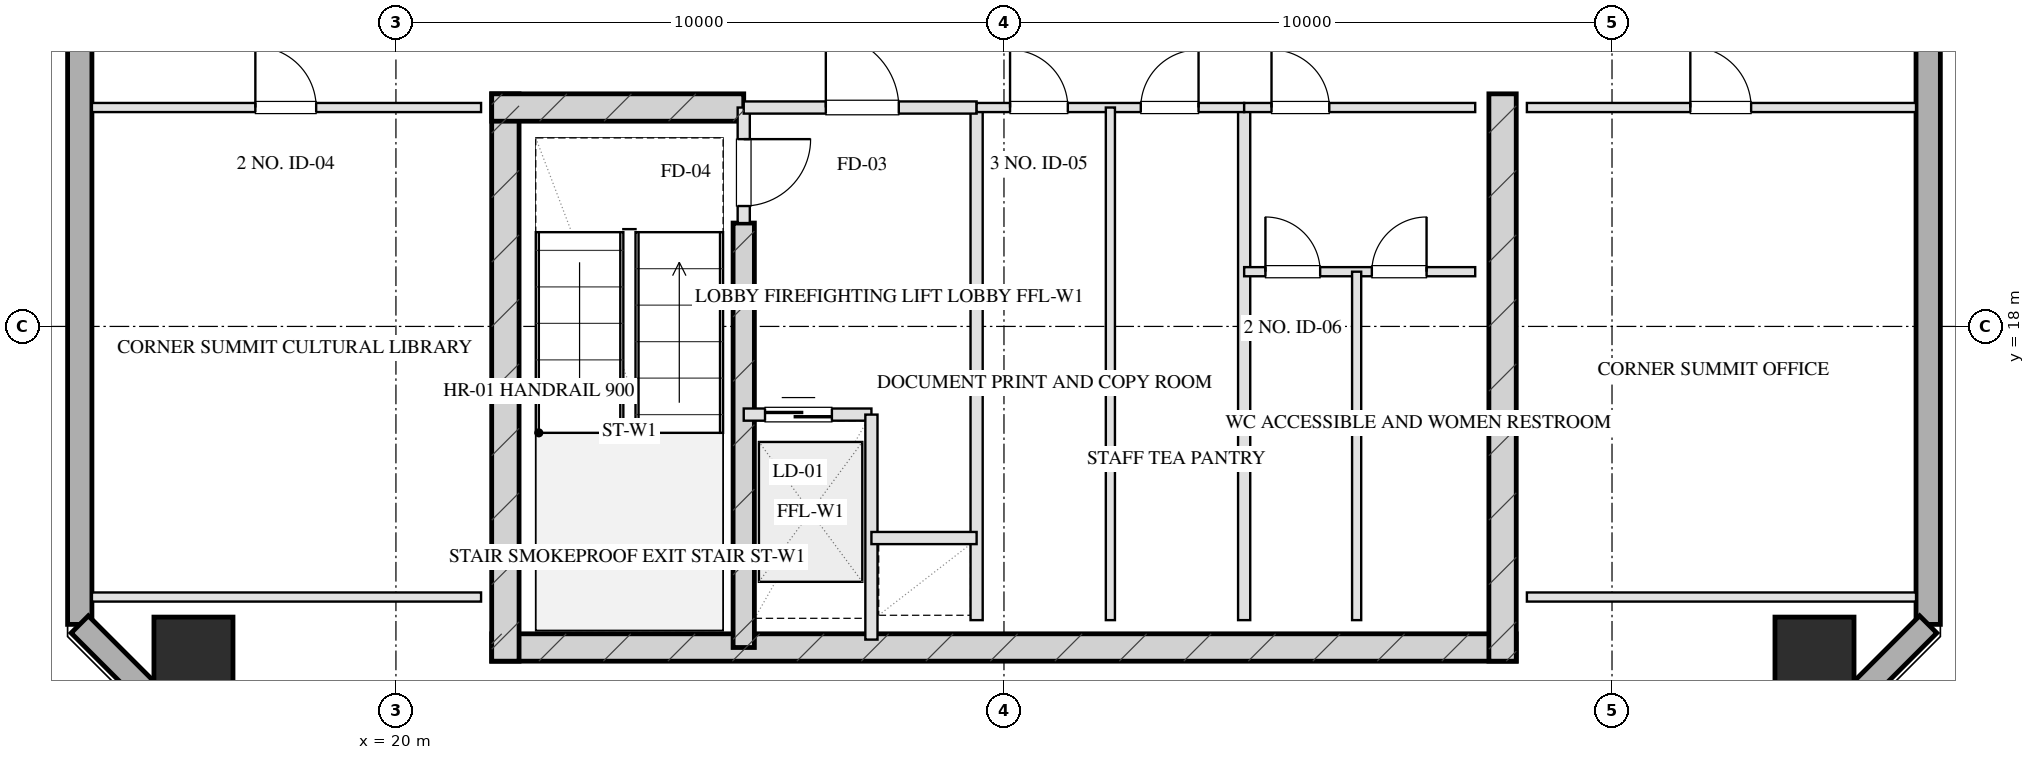
"""IFC4 building model, lengths in metres.
Left out: names, types, materials, properties, quantities, classifications, styles, units other than length and angle.
Written with IfcOpenShell. Run it as: python <this file> out.ifc"""

import sys

from ifc_helpers import new_model, si_unit, direction, frame, frame_2d, origin, origin_2d, place, context, subcontext, project, spatial, rectangle, hollow_rectangle, extrude, element, fill, save


model = new_model("IFC4")
c1 = context("Model", 3, precision=1e-05, world=origin(), true_north=direction((0.0, 1.0)))
c2 = subcontext(c1, "Body", "Model", "MODEL_VIEW")
j1 = project(units=[si_unit("LENGTHUNIT", "METRE"), si_unit("PLANEANGLEUNIT", "RADIAN")], contexts=[c1])
p1 = place(None, origin())
s1 = spatial("IfcSite", under=j1, at=p1, CompositionType="ELEMENT")
p2 = place(p1, origin())
s2 = spatial("IfcBuilding", under=s1, at=p2, CompositionType="ELEMENT")
p3 = place(p2, frame((0.0, 0.0, 276.0)))
s3 = spatial("IfcBuildingStorey", under=s2, at=p3, CompositionType="ELEMENT", Elevation=276.0)
p4 = place(p3, frame((21.575, 12.72, 0.0), z_axis=(0.0, 0.0, 1.0), x_axis=(1.0, 0.0, 0.0)))
e1 = element("IfcWall", 1, at=p4, inside=s3, PredefinedType="SHEAR", context=c2, shape_type="SweptSolid", body=[
    extrude(rectangle(XDim=16.85, YDim=0.45, at=frame_2d((8.425, 0.0))), origin(), (0.0, 0.0, 1.0), 4.2),
])
for number, where, z_axis, x_axis in (
    (2, (21.8, 21.825, 0.0), (0.0, 0.0, 1.0), (0.0, -1.0, 0.0)),
    (3, (38.2, 21.825, 0.0), (0.0, 0.0, 1.0), (0.0, -1.0, 0.0)),
):
    element("IfcWall", number, at=place(p3, frame(where, z_axis=z_axis, x_axis=x_axis)), inside=s3, PredefinedType="SHEAR", context=c2, shape_type="SweptSolid", body=[
        extrude(rectangle(XDim=9.33, YDim=0.45, at=frame_2d((4.665, 0.0))), origin(), (0.0, 0.0, 1.0), 4.2),
    ])
p5 = place(p3, frame((25.72, 19.7, 0.0), z_axis=(0.0, 0.0, 1.0), x_axis=(0.0, -1.0, 0.0)))
e4 = element("IfcWall", 4, at=p5, inside=s3, PredefinedType="SHEAR", context=c2, shape_type="SweptSolid", body=[
    extrude(rectangle(XDim=6.98, YDim=0.35, at=frame_2d((3.49, 0.0))), origin(), (0.0, 0.0, 1.0), 4.2),
])
p6 = place(p3, frame((21.575, 21.6, 0.0), z_axis=(0.0, 0.0, 1.0), x_axis=(1.0, 0.0, 0.0)))
e5 = element("IfcWall", 5, at=p6, inside=s3, PredefinedType="SHEAR", context=c2, shape_type="SweptSolid", body=[
    extrude(rectangle(XDim=4.145, YDim=0.45, at=frame_2d((2.073, 0.0))), origin(), (0.0, 0.0, 1.0), 4.2),
])
for number, where, z_axis, x_axis in (
    (6, (16.67, 12.57, 0.0), (0.0, 0.0, 1.0), (1.0, 0.0, 0.0)),
    (7, (43.33, 12.57, 0.0), (0.0, 0.0, 1.0), (1.0, 0.0, 0.0)),
):
    element("IfcColumn", number, at=place(p3, frame(where, z_axis=z_axis, x_axis=x_axis)), inside=s3, PredefinedType="COLUMN", context=c2, shape_type="SweptSolid", body=[
        extrude(hollow_rectangle(XDim=1.3, YDim=1.3, WallThickness=0.045, at=origin_2d()), origin(), (0.0, 0.0, 1.0), 4.201),
    ])
p7 = place(p3, frame((14.8, 13.1, 0.0), z_axis=(0.0, 0.0, 1.0), x_axis=(0.0, 1.0, 0.0)))
e8 = element("IfcWall", 8, at=p7, inside=s3, PredefinedType="SOLIDWALL", context=c2, shape_type="SweptSolid", body=[
    extrude(rectangle(XDim=41.8, YDim=0.4, at=frame_2d((20.9, 0.0))), origin(), (0.0, 0.0, 1.0), 3.33),
])
p8 = place(p7, frame((22.525, 0.0, 0.75)))
e9 = element("IfcOpeningElement", 9, at=p8, cuts=e8, PredefinedType="OPENING", context=c2, shape_type="SweptSolid", body=[
    extrude(rectangle(XDim=1.95, YDim=1.65, at=frame_2d((0.975, 0.825))), frame((0.0, 0.21, 0.0), z_axis=(0.0, -1.0, 0.0), x_axis=(1.0, 0.0, 0.0)), (0.0, 0.0, 1.0), 0.42),
])
p9 = place(p7, frame((26.325, 0.0, 0.75)))
e10 = element("IfcOpeningElement", 10, at=p9, cuts=e8, PredefinedType="OPENING", context=c2, shape_type="SweptSolid", body=[
    extrude(rectangle(XDim=1.95, YDim=1.65, at=frame_2d((0.975, 0.825))), frame((0.0, 0.21, 0.0), z_axis=(0.0, -1.0, 0.0), x_axis=(1.0, 0.0, 0.0)), (0.0, 0.0, 1.0), 0.42),
])
p10 = place(p7, frame((17.25, 0.0, 0.0)))
e11 = element("IfcOpeningElement", 11, at=p10, cuts=e8, PredefinedType="OPENING", context=c2, shape_type="SweptSolid", body=[
    extrude(rectangle(XDim=1.1, YDim=2.15, at=frame_2d((0.55, 1.075))), frame((0.0, 0.21, 0.0), z_axis=(0.0, -1.0, 0.0), x_axis=(1.0, 0.0, 0.0)), (0.0, 0.0, 1.0), 0.42),
])
p11 = place(p3, frame((45.2, 54.9, 0.0), z_axis=(0.0, 0.0, 1.0), x_axis=(0.0, -1.0, 0.0)))
e12 = element("IfcWall", 12, at=p11, inside=s3, PredefinedType="SOLIDWALL", context=c2, shape_type="SweptSolid", body=[
    extrude(rectangle(XDim=41.8, YDim=0.4, at=frame_2d((20.9, 0.0))), origin(), (0.0, 0.0, 1.0), 3.33),
])
p12 = place(p11, frame((17.325, 0.0, 0.75)))
e13 = element("IfcOpeningElement", 13, at=p12, cuts=e12, PredefinedType="OPENING", context=c2, shape_type="SweptSolid", body=[
    extrude(rectangle(XDim=1.95, YDim=1.65, at=frame_2d((0.975, 0.825))), frame((0.0, 0.21, 0.0), z_axis=(0.0, -1.0, 0.0), x_axis=(1.0, 0.0, 0.0)), (0.0, 0.0, 1.0), 0.42),
])
p13 = place(p11, frame((13.525, 0.0, 0.75)))
e14 = element("IfcOpeningElement", 14, at=p13, cuts=e12, PredefinedType="OPENING", context=c2, shape_type="SweptSolid", body=[
    extrude(rectangle(XDim=1.95, YDim=1.65, at=frame_2d((0.975, 0.825))), frame((0.0, 0.21, 0.0), z_axis=(0.0, -1.0, 0.0), x_axis=(1.0, 0.0, 0.0)), (0.0, 0.0, 1.0), 0.42),
])
p14 = place(p11, frame((26.15, 0.0, 0.0)))
e15 = element("IfcOpeningElement", 15, at=p14, cuts=e12, PredefinedType="OPENING", context=c2, shape_type="SweptSolid", body=[
    extrude(rectangle(XDim=1.1, YDim=2.15, at=frame_2d((0.55, 1.075))), frame((0.0, 0.21, 0.0), z_axis=(0.0, -1.0, 0.0), x_axis=(1.0, 0.0, 0.0)), (0.0, 0.0, 1.0), 0.42),
])
for number, where, z_axis, x_axis in (
    (16, (45.2, 13.1, 0.0), (0.0, 0.0, 1.0), (-0.707, -0.707, 0.0)),
    (17, (17.2, 10.7, 0.0), (0.0, 0.0, 1.0), (-0.707, 0.707, 0.0)),
):
    element("IfcWall", number, at=place(p3, frame(where, z_axis=z_axis, x_axis=x_axis)), inside=s3, PredefinedType="SOLIDWALL", context=c2, shape_type="SweptSolid", body=[
        extrude(rectangle(XDim=3.394, YDim=0.4, at=frame_2d((1.697, 0.0))), origin(), (0.0, 0.0, 1.0), 3.33),
    ])
p15 = place(p3, frame((25.72, 21.6, 0.0), z_axis=(0.0, 0.0, 1.0), x_axis=(0.0, -1.0, 0.0)))
e18 = element("IfcWall", 18, at=p15, inside=s3, PredefinedType="PARTITIONING", context=c2, shape_type="SweptSolid", body=[
    extrude(rectangle(XDim=1.9, YDim=0.2, at=frame_2d((0.95, 0.0))), origin(), (0.0, 0.0, 1.0), 3.925),
])
p16 = place(p15, frame((0.52, 0.0, 0.0)))
e19 = element("IfcOpeningElement", 19, at=p16, cuts=e18, PredefinedType="OPENING", context=c2, shape_type="SweptSolid", body=[
    extrude(rectangle(XDim=1.1, YDim=2.05, at=frame_2d((0.55, 1.025))), frame((0.0, 0.11, 0.0), z_axis=(0.0, -1.0, 0.0), x_axis=(1.0, 0.0, 0.0)), (0.0, 0.0, 1.0), 0.22),
])
p17 = place(p3, frame((29.55, 21.6, 0.0), z_axis=(0.0, 0.0, 1.0), x_axis=(0.0, -1.0, 0.0)))
e20 = element("IfcWall", 20, at=p17, inside=s3, PredefinedType="PARTITIONING", context=c2, shape_type="SweptSolid", body=[
    extrude(rectangle(XDim=8.43, YDim=0.2, at=frame_2d((4.215, 0.0))), origin(), (0.0, 0.0, 1.0), 3.925),
])
p18 = place(p3, frame((25.72, 21.6, 0.0), z_axis=(0.0, 0.0, 1.0), x_axis=(1.0, 0.0, 0.0)))
e21 = element("IfcWall", 21, at=p18, inside=s3, PredefinedType="PARTITIONING", context=c2, shape_type="SweptSolid", body=[
    extrude(rectangle(XDim=3.83, YDim=0.2, at=frame_2d((1.915, 0.0))), origin(), (0.0, 0.0, 1.0), 3.925),
])
p19 = place(p18, frame((1.35, 0.0, 0.0)))
e22 = element("IfcOpeningElement", 22, at=p19, cuts=e21, PredefinedType="OPENING", context=c2, shape_type="SweptSolid", body=[
    extrude(rectangle(XDim=1.2, YDim=2.05, at=frame_2d((0.6, 1.025))), frame((0.0, 0.11, 0.0), z_axis=(0.0, -1.0, 0.0), x_axis=(1.0, 0.0, 0.0)), (0.0, 0.0, 1.0), 0.22),
])
p20 = place(p3, frame((25.72, 16.55, 0.0), z_axis=(0.0, 0.0, 1.0), x_axis=(1.0, 0.0, 0.0)))
e23 = element("IfcWall", 23, at=p20, inside=s3, PredefinedType="PARTITIONING", context=c2, shape_type="SweptSolid", body=[
    extrude(rectangle(XDim=2.1, YDim=0.2, at=frame_2d((1.05, 0.0))), origin(), (0.0, 0.0, 1.0), 3.925),
])
p21 = place(p20, frame((0.35, 0.0, 0.0)))
e24 = element("IfcOpeningElement", 24, at=p21, cuts=e23, PredefinedType="OPENING", context=c2, shape_type="SweptSolid", body=[
    extrude(rectangle(XDim=1.1, YDim=2.05, at=frame_2d((0.55, 1.025))), frame((0.0, 0.11, 0.0), z_axis=(0.0, -1.0, 0.0), x_axis=(1.0, 0.0, 0.0)), (0.0, 0.0, 1.0), 0.22),
])
p22 = place(p3, frame((27.82, 16.55, 0.0), z_axis=(0.0, 0.0, 1.0), x_axis=(0.0, -1.0, 0.0)))
e25 = element("IfcWall", 25, at=p22, inside=s3, PredefinedType="PARTITIONING", context=c2, shape_type="SweptSolid", body=[
    extrude(rectangle(XDim=3.7, YDim=0.2, at=frame_2d((1.85, 0.0))), origin(), (0.0, 0.0, 1.0), 3.925),
])
p23 = place(p3, frame((27.82, 14.52, 0.0), z_axis=(0.0, 0.0, 1.0), x_axis=(1.0, 0.0, 0.0)))
e26 = element("IfcWall", 26, at=p23, inside=s3, PredefinedType="PARTITIONING", context=c2, shape_type="SweptSolid", body=[
    extrude(rectangle(XDim=1.73, YDim=0.2, at=frame_2d((0.865, 0.0))), origin(), (0.0, 0.0, 1.0), 3.925),
])
p24 = place(p3, frame((33.95, 21.6, 0.0), z_axis=(0.0, 0.0, 1.0), x_axis=(0.0, -1.0, 0.0)))
e27 = element("IfcWall", 27, at=p24, inside=s3, PredefinedType="PARTITIONING", context=c2, shape_type="SweptSolid", body=[
    extrude(rectangle(XDim=8.43, YDim=0.2, at=frame_2d((4.215, 0.0))), origin(), (0.0, 0.0, 1.0), 3.925),
])
p25 = place(p3, frame((29.55, 21.6, 0.0), z_axis=(0.0, 0.0, 1.0), x_axis=(1.0, 0.0, 0.0)))
e28 = element("IfcWall", 28, at=p25, inside=s3, PredefinedType="PARTITIONING", context=c2, shape_type="SweptSolid", body=[
    extrude(rectangle(XDim=4.4, YDim=0.15, at=frame_2d((2.2, 0.0))), origin(), (0.0, 0.0, 1.0), 3.925),
])
p26 = place(p25, frame((0.55, 0.0, 0.0)))
e29 = element("IfcOpeningElement", 29, at=p26, cuts=e28, PredefinedType="OPENING", context=c2, shape_type="SweptSolid", body=[
    extrude(rectangle(XDim=0.95, YDim=2.05, at=frame_2d((0.475, 1.025))), frame((0.0, 0.085, 0.0), z_axis=(0.0, -1.0, 0.0), x_axis=(1.0, 0.0, 0.0)), (0.0, 0.0, 1.0), 0.17),
])
p27 = place(p25, frame((2.7, 0.0, 0.0)))
e30 = element("IfcOpeningElement", 30, at=p27, cuts=e28, PredefinedType="OPENING", context=c2, shape_type="SweptSolid", body=[
    extrude(rectangle(XDim=0.95, YDim=2.05, at=frame_2d((0.475, 1.025))), frame((0.0, 0.085, 0.0), z_axis=(0.0, -1.0, 0.0), x_axis=(1.0, 0.0, 0.0)), (0.0, 0.0, 1.0), 0.17),
])
p28 = place(p3, frame((31.75, 21.6, 0.0), z_axis=(0.0, 0.0, 1.0), x_axis=(0.0, -1.0, 0.0)))
e31 = element("IfcWall", 31, at=p28, inside=s3, PredefinedType="PARTITIONING", context=c2, shape_type="SweptSolid", body=[
    extrude(rectangle(XDim=8.43, YDim=0.15, at=frame_2d((4.215, 0.0))), origin(), (0.0, 0.0, 1.0), 3.925),
])
p29 = place(p3, frame((33.95, 21.6, 0.0), z_axis=(0.0, 0.0, 1.0), x_axis=(1.0, 0.0, 0.0)))
e32 = element("IfcWall", 32, at=p29, inside=s3, PredefinedType="PARTITIONING", context=c2, shape_type="SweptSolid", body=[
    extrude(rectangle(XDim=3.8, YDim=0.15, at=frame_2d((1.9, 0.0))), origin(), (0.0, 0.0, 1.0), 3.925),
])
p30 = place(p29, frame((0.45, 0.0, 0.0)))
e33 = element("IfcOpeningElement", 33, at=p30, cuts=e32, PredefinedType="OPENING", context=c2, shape_type="SweptSolid", body=[
    extrude(rectangle(XDim=0.95, YDim=2.05, at=frame_2d((0.475, 1.025))), frame((0.0, 0.085, 0.0), z_axis=(0.0, -1.0, 0.0), x_axis=(1.0, 0.0, 0.0)), (0.0, 0.0, 1.0), 0.17),
])
p31 = place(p3, frame((33.95, 18.9, 0.0), z_axis=(0.0, 0.0, 1.0), x_axis=(1.0, 0.0, 0.0)))
e34 = element("IfcWall", 34, at=p31, inside=s3, PredefinedType="PARTITIONING", context=c2, shape_type="SweptSolid", body=[
    extrude(rectangle(XDim=3.8, YDim=0.15, at=frame_2d((1.9, 0.0))), origin(), (0.0, 0.0, 1.0), 3.925),
])
p32 = place(p31, frame((0.35, 0.0, 0.0)))
e35 = element("IfcOpeningElement", 35, at=p32, cuts=e34, PredefinedType="OPENING", context=c2, shape_type="SweptSolid", body=[
    extrude(rectangle(XDim=0.9, YDim=2.05, at=frame_2d((0.45, 1.025))), frame((0.0, 0.085, 0.0), z_axis=(0.0, -1.0, 0.0), x_axis=(1.0, 0.0, 0.0)), (0.0, 0.0, 1.0), 0.17),
])
p33 = place(p31, frame((2.1, 0.0, 0.0)))
e36 = element("IfcOpeningElement", 36, at=p33, cuts=e34, PredefinedType="OPENING", context=c2, shape_type="SweptSolid", body=[
    extrude(rectangle(XDim=0.9, YDim=2.05, at=frame_2d((0.45, 1.025))), frame((0.0, 0.085, 0.0), z_axis=(0.0, -1.0, 0.0), x_axis=(1.0, 0.0, 0.0)), (0.0, 0.0, 1.0), 0.17),
])
p34 = place(p3, frame((35.8, 18.9, 0.0), z_axis=(0.0, 0.0, 1.0), x_axis=(0.0, -1.0, 0.0)))
e37 = element("IfcWall", 37, at=p34, inside=s3, PredefinedType="PARTITIONING", context=c2, shape_type="SweptSolid", body=[
    extrude(rectangle(XDim=5.73, YDim=0.15, at=frame_2d((2.865, 0.0))), origin(), (0.0, 0.0, 1.0), 3.925),
])
p35 = place(p3, frame((15.0, 13.55, 0.0), z_axis=(0.0, 0.0, 1.0), x_axis=(1.0, 0.0, 0.0)))
e38 = element("IfcWall", 38, at=p35, inside=s3, PredefinedType="PARTITIONING", context=c2, shape_type="SweptSolid", body=[
    extrude(rectangle(XDim=6.4, YDim=0.15, at=frame_2d((3.2, 0.0))), origin(), (0.0, 0.0, 1.0), 3.925),
])
p36 = place(p3, frame((15.0, 21.6, 0.0), z_axis=(0.0, 0.0, 1.0), x_axis=(1.0, 0.0, 0.0)))
e39 = element("IfcWall", 39, at=p36, inside=s3, PredefinedType="PARTITIONING", context=c2, shape_type="SweptSolid", body=[
    extrude(rectangle(XDim=6.4, YDim=0.15, at=frame_2d((3.2, 0.0))), origin(), (0.0, 0.0, 1.0), 3.925),
])
p37 = place(p36, frame((2.688, 0.0, 0.0)))
e40 = element("IfcOpeningElement", 40, at=p37, cuts=e39, PredefinedType="OPENING", context=c2, shape_type="SweptSolid", body=[
    extrude(rectangle(XDim=1.0, YDim=2.05, at=frame_2d((0.5, 1.025))), frame((0.0, 0.085, 0.0), z_axis=(0.0, -1.0, 0.0), x_axis=(1.0, 0.0, 0.0)), (0.0, 0.0, 1.0), 0.17),
])
p38 = place(p3, frame((38.6, 13.55, 0.0), z_axis=(0.0, 0.0, 1.0), x_axis=(1.0, 0.0, 0.0)))
e41 = element("IfcWall", 41, at=p38, inside=s3, PredefinedType="PARTITIONING", context=c2, shape_type="SweptSolid", body=[
    extrude(rectangle(XDim=6.4, YDim=0.15, at=frame_2d((3.2, 0.0))), origin(), (0.0, 0.0, 1.0), 3.925),
])
p39 = place(p3, frame((38.6, 21.6, 0.0), z_axis=(0.0, 0.0, 1.0), x_axis=(1.0, 0.0, 0.0)))
e42 = element("IfcWall", 42, at=p39, inside=s3, PredefinedType="PARTITIONING", context=c2, shape_type="SweptSolid", body=[
    extrude(rectangle(XDim=6.4, YDim=0.15, at=frame_2d((3.2, 0.0))), origin(), (0.0, 0.0, 1.0), 3.925),
])
p40 = place(p39, frame((2.688, 0.0, 0.0)))
e43 = element("IfcOpeningElement", 43, at=p40, cuts=e42, PredefinedType="OPENING", context=c2, shape_type="SweptSolid", body=[
    extrude(rectangle(XDim=1.0, YDim=2.05, at=frame_2d((0.5, 1.025))), frame((0.0, 0.085, 0.0), z_axis=(0.0, -1.0, 0.0), x_axis=(1.0, 0.0, 0.0)), (0.0, 0.0, 1.0), 0.17),
])
p41 = place(p16, origin())
e44 = element("IfcDoor", 44, at=p41, inside=s3, OperationType="SINGLE_SWING_LEFT", PredefinedType="DOOR", context=c2, shape_type="SweptSolid", body=[
    extrude(rectangle(XDim=1.1, YDim=2.05, at=frame_2d((0.55, 1.025))), frame((0.0, 0.025, 0.0), z_axis=(0.0, -1.0, 0.0), x_axis=(1.0, 0.0, 0.0)), (0.0, 0.0, 1.0), 0.05),
])
fill(e19, e44)
p42 = place(p19, origin())
e45 = element("IfcDoor", 45, at=p42, inside=s3, OperationType="SINGLE_SWING_LEFT", PredefinedType="DOOR", context=c2, shape_type="SweptSolid", body=[
    extrude(rectangle(XDim=1.2, YDim=2.05, at=frame_2d((0.6, 1.025))), frame((0.0, 0.025, 0.0), z_axis=(0.0, -1.0, 0.0), x_axis=(1.0, 0.0, 0.0)), (0.0, 0.0, 1.0), 0.05),
])
fill(e22, e45)
p43 = place(p21, origin())
e46 = element("IfcDoor", 46, at=p43, inside=s3, OperationType="DOUBLE_DOOR_SLIDING", PredefinedType="DOOR", context=c2, shape_type="SweptSolid", body=[
    extrude(rectangle(XDim=1.1, YDim=2.05, at=frame_2d((0.55, 1.025))), frame((0.0, 0.025, 0.0), z_axis=(0.0, -1.0, 0.0), x_axis=(1.0, 0.0, 0.0)), (0.0, 0.0, 1.0), 0.05),
])
fill(e24, e46)
p44 = place(p26, origin())
e47 = element("IfcDoor", 47, at=p44, inside=s3, OperationType="SINGLE_SWING_LEFT", PredefinedType="DOOR", context=c2, shape_type="SweptSolid", body=[
    extrude(rectangle(XDim=0.95, YDim=2.05, at=frame_2d((0.475, 1.025))), frame((0.0, 0.025, 0.0), z_axis=(0.0, -1.0, 0.0), x_axis=(1.0, 0.0, 0.0)), (0.0, 0.0, 1.0), 0.05),
])
fill(e29, e47)
p45 = place(p27, origin())
e48 = element("IfcDoor", 48, at=p45, inside=s3, OperationType="SINGLE_SWING_RIGHT", PredefinedType="DOOR", context=c2, shape_type="SweptSolid", body=[
    extrude(rectangle(XDim=0.95, YDim=2.05, at=frame_2d((0.475, 1.025))), frame((0.0, 0.025, 0.0), z_axis=(0.0, -1.0, 0.0), x_axis=(1.0, 0.0, 0.0)), (0.0, 0.0, 1.0), 0.05),
])
fill(e30, e48)
p46 = place(p30, origin())
e49 = element("IfcDoor", 49, at=p46, inside=s3, OperationType="SINGLE_SWING_LEFT", PredefinedType="DOOR", context=c2, shape_type="SweptSolid", body=[
    extrude(rectangle(XDim=0.95, YDim=2.05, at=frame_2d((0.475, 1.025))), frame((0.0, 0.025, 0.0), z_axis=(0.0, -1.0, 0.0), x_axis=(1.0, 0.0, 0.0)), (0.0, 0.0, 1.0), 0.05),
])
fill(e33, e49)
p47 = place(p32, origin())
e50 = element("IfcDoor", 50, at=p47, inside=s3, OperationType="SINGLE_SWING_LEFT", PredefinedType="DOOR", context=c2, shape_type="SweptSolid", body=[
    extrude(rectangle(XDim=0.9, YDim=2.05, at=frame_2d((0.45, 1.025))), frame((0.0, 0.025, 0.0), z_axis=(0.0, -1.0, 0.0), x_axis=(1.0, 0.0, 0.0)), (0.0, 0.0, 1.0), 0.05),
])
fill(e35, e50)
p48 = place(p33, origin())
e51 = element("IfcDoor", 51, at=p48, inside=s3, OperationType="SINGLE_SWING_RIGHT", PredefinedType="DOOR", context=c2, shape_type="SweptSolid", body=[
    extrude(rectangle(XDim=0.9, YDim=2.05, at=frame_2d((0.45, 1.025))), frame((0.0, 0.025, 0.0), z_axis=(0.0, -1.0, 0.0), x_axis=(1.0, 0.0, 0.0)), (0.0, 0.0, 1.0), 0.05),
])
fill(e36, e51)
p49 = place(p37, origin())
e52 = element("IfcDoor", 52, at=p49, inside=s3, OperationType="SINGLE_SWING_LEFT", PredefinedType="DOOR", context=c2, shape_type="SweptSolid", body=[
    extrude(rectangle(XDim=1.0, YDim=2.05, at=frame_2d((0.5, 1.025))), frame((0.0, 0.025, 0.0), z_axis=(0.0, -1.0, 0.0), x_axis=(1.0, 0.0, 0.0)), (0.0, 0.0, 1.0), 0.05),
])
fill(e40, e52)
p50 = place(p40, origin())
e53 = element("IfcDoor", 53, at=p50, inside=s3, OperationType="SINGLE_SWING_LEFT", PredefinedType="DOOR", context=c2, shape_type="SweptSolid", body=[
    extrude(rectangle(XDim=1.0, YDim=2.05, at=frame_2d((0.5, 1.025))), frame((0.0, 0.025, 0.0), z_axis=(0.0, -1.0, 0.0), x_axis=(1.0, 0.0, 0.0)), (0.0, 0.0, 1.0), 0.05),
])
fill(e43, e53)
save(model, sys.argv[1])
